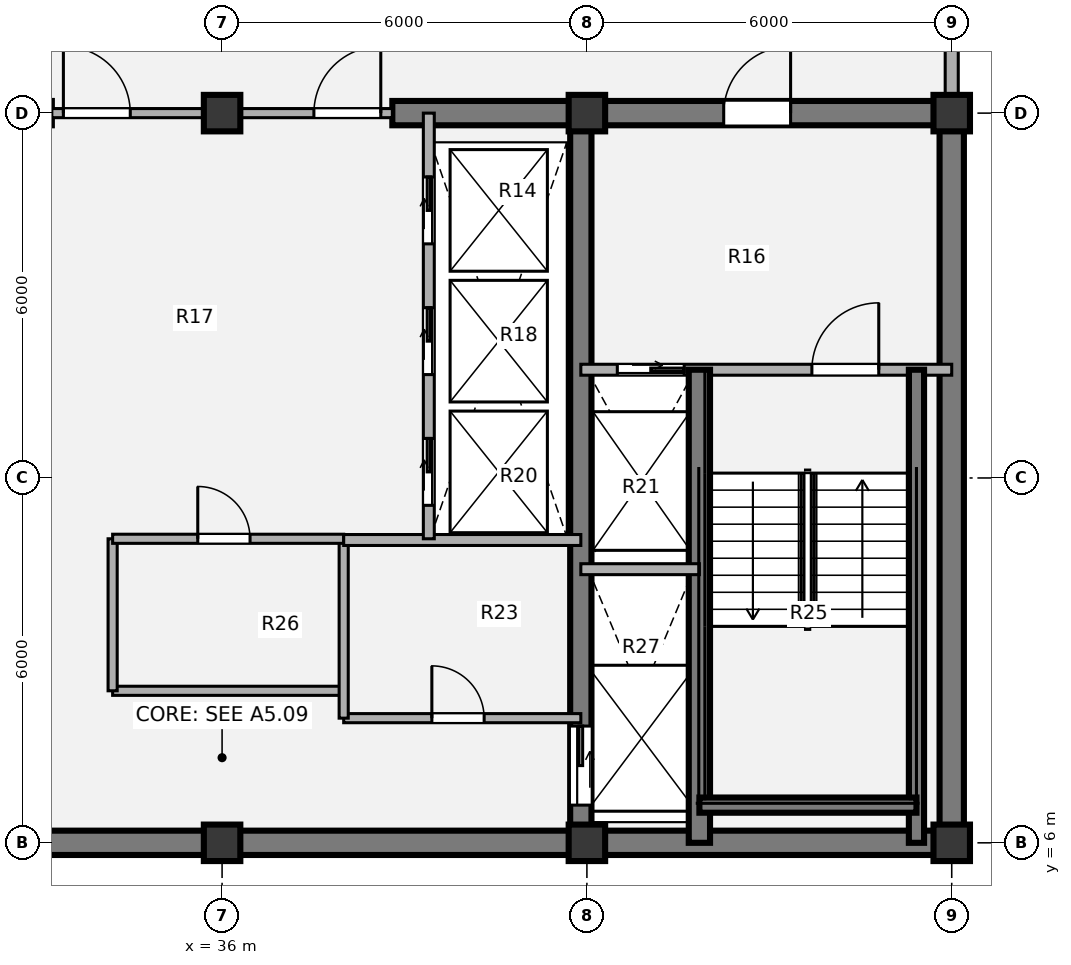
"""IFC4 building model, lengths in metres.
Left out: names, types, materials, properties, quantities, classifications, styles, units other than length and angle.
Written with IfcOpenShell. Run it as: python <this file> out.ifc"""

import sys

from ifc_helpers import new_model, si_unit, direction, frame, frame_2d, origin, origin_2d, place, context, subcontext, project, spatial, rectangle, extrude, source, transform, mapped, element, fill, save


model = new_model("IFC4")
c1 = context("Model", 3, precision=1e-05, world=origin(), true_north=direction((0.0, 1.0)))
c2 = subcontext(c1, "Body", "Model", "MODEL_VIEW")
j1 = project(units=[si_unit("LENGTHUNIT", "METRE"), si_unit("PLANEANGLEUNIT", "RADIAN")], contexts=[c1])
p1 = place(None, origin())
s1 = spatial("IfcSite", under=j1, at=p1, CompositionType="ELEMENT")
p2 = place(p1, origin())
s2 = spatial("IfcBuilding", under=s1, at=p2, CompositionType="ELEMENT")
p3 = place(p2, frame((0.0, 0.0, 283.5)))
s3 = spatial("IfcBuildingStorey", under=s2, at=p3, CompositionType="ELEMENT", Elevation=283.5)
m1 = source(origin(), c2, "Body", "SweptSolid", [
    extrude(rectangle(XDim=0.6, YDim=0.6, at=origin_2d()), origin(), (0.0, 0.0, 1.0), 3.78),
])
for number, where, z_axis, x_axis in (
    (1, (36.0, 6.0, 0.0), (0.0, 0.0, 1.0), (1.0, 0.0, 0.0)),
    (2, (42.0, 6.0, 0.0), (0.0, 0.0, 1.0), (1.0, 0.0, 0.0)),
    (3, (48.0, 6.0, 0.0), (0.0, 0.0, 1.0), (1.0, 0.0, 0.0)),
    (4, (36.0, 18.0, 0.0), (0.0, 0.0, 1.0), (1.0, 0.0, 0.0)),
    (5, (42.0, 18.0, 0.0), (0.0, 0.0, 1.0), (1.0, 0.0, 0.0)),
    (6, (48.0, 18.0, 0.0), (0.0, 0.0, 1.0), (1.0, 0.0, 0.0)),
):
    element("IfcColumn", number, at=place(p3, frame(where, z_axis=z_axis, x_axis=x_axis)), inside=s3, PredefinedType="COLUMN", context=c2, shape_type="MappedRepresentation", body=[
        mapped(m1, transform((0.0, 0.0, 0.0), x_axis=(1.0, 0.0, 0.0), y_axis=(0.0, 1.0, 0.0), z_axis=(0.0, 0.0, 1.0), scale=1.0)),
    ])
p4 = place(p3, frame((48.2, 6.0, 0.0), z_axis=(0.0, 0.0, 1.0), x_axis=(-1.0, 0.0, 0.0)))
e7 = element("IfcWall", 7, at=p4, inside=s3, PredefinedType="SHEAR", context=c2, shape_type="SweptSolid", body=[
    extrude(rectangle(XDim=24.4, YDim=0.4, at=frame_2d((12.2, 0.0))), origin(), (0.0, 0.0, 1.0), 3.78),
])
p5 = place(p3, frame((48.0, 18.0, 0.0), z_axis=(0.0, 0.0, 1.0), x_axis=(0.0, -1.0, 0.0)))
e8 = element("IfcWall", 8, at=p5, inside=s3, PredefinedType="SHEAR", context=c2, shape_type="SweptSolid", body=[
    extrude(rectangle(XDim=12.0, YDim=0.4, at=frame_2d((6.0, 0.0))), origin(), (0.0, 0.0, 1.0), 3.78),
])
p6 = place(p3, frame((38.8, 18.0, 0.0), z_axis=(0.0, 0.0, 1.0), x_axis=(1.0, 0.0, 0.0)))
e9 = element("IfcWall", 9, at=p6, inside=s3, PredefinedType="SHEAR", context=c2, shape_type="SweptSolid", body=[
    extrude(rectangle(XDim=9.4, YDim=0.4, at=frame_2d((4.7, 0.0))), origin(), (0.0, 0.0, 1.0), 3.78),
])
p7 = place(p6, frame((5.45, 0.0, 0.0)))
e10 = element("IfcOpeningElement", 10, at=p7, cuts=e9, PredefinedType="OPENING", context=c2, shape_type="SweptSolid", body=[
    extrude(rectangle(XDim=1.1, YDim=2.1, at=origin_2d()), frame((0.55, 0.21, 1.05), z_axis=(0.0, -1.0, 0.0), x_axis=(1.0, 0.0, 0.0)), (0.0, 0.0, 1.0), 0.42),
])
p8 = place(p3, frame((41.9, 18.0, 0.0), z_axis=(0.0, 0.0, 1.0), x_axis=(0.0, -1.0, 0.0)))
e11 = element("IfcWall", 11, at=p8, inside=s3, PredefinedType="SHEAR", context=c2, shape_type="SweptSolid", body=[
    extrude(rectangle(XDim=12.0, YDim=0.35, at=frame_2d((6.0, 0.0))), origin(), (0.0, 0.0, 1.0), 3.78),
])
p9 = place(p8, frame((10.08, 0.0, 0.0)))
e12 = element("IfcOpeningElement", 12, at=p9, cuts=e11, PredefinedType="OPENING", context=c2, shape_type="SweptSolid", body=[
    extrude(rectangle(XDim=1.3, YDim=2.1, at=origin_2d()), frame((0.65, 0.185, 1.05), z_axis=(0.0, -1.0, 0.0), x_axis=(1.0, 0.0, 0.0)), (0.0, 0.0, 1.0), 0.37),
])
p10 = place(p3, frame((48.0, 21.05, 0.0), z_axis=(0.0, 0.0, 1.0), x_axis=(0.0, -1.0, 0.0)))
e13 = element("IfcWall", 13, at=p10, inside=s3, PredefinedType="SOLIDWALL", context=c2, shape_type="SweptSolid", body=[
    extrude(rectangle(XDim=2.77, YDim=0.215, at=frame_2d((1.385, 0.0))), origin(), (0.0, 0.0, 1.0), 2.718),
])
p11 = place(p3, frame((34.2, 8.5, 0.0), z_axis=(0.0, 0.0, 1.0), x_axis=(1.0, 0.0, 0.0)))
e14 = element("IfcWall", 14, at=p11, inside=s3, PredefinedType="PARTITIONING", context=c2, shape_type="SweptSolid", body=[
    extrude(rectangle(XDim=3.8, YDim=0.15, at=frame_2d((1.9, 0.0))), origin(), (0.0, 0.0, 1.0), 3.5),
])
p12 = place(p3, frame((38.0, 8.05, 0.0), z_axis=(0.0, 0.0, 1.0), x_axis=(1.0, 0.0, 0.0)))
e15 = element("IfcWall", 15, at=p12, inside=s3, PredefinedType="PARTITIONING", context=c2, shape_type="SweptSolid", body=[
    extrude(rectangle(XDim=3.9, YDim=0.15, at=frame_2d((1.95, 0.0))), origin(), (0.0, 0.0, 1.0), 3.5),
])
p13 = place(p12, frame((1.45, 0.0, 0.0)))
e16 = element("IfcOpeningElement", 16, at=p13, cuts=e15, PredefinedType="OPENING", context=c2, shape_type="SweptSolid", body=[
    extrude(rectangle(XDim=0.86, YDim=2.1, at=origin_2d()), frame((0.43, 0.085, 1.05), z_axis=(0.0, -1.0, 0.0), x_axis=(1.0, 0.0, 0.0)), (0.0, 0.0, 1.0), 0.17),
])
p14 = place(p3, frame((34.2, 8.5, 0.0), z_axis=(0.0, 0.0, 1.0), x_axis=(0.0, 1.0, 0.0)))
e17 = element("IfcWall", 17, at=p14, inside=s3, PredefinedType="PARTITIONING", context=c2, shape_type="SweptSolid", body=[
    extrude(rectangle(XDim=2.5, YDim=0.15, at=frame_2d((1.25, 0.0))), origin(), (0.0, 0.0, 1.0), 3.5),
])
p15 = place(p3, frame((38.0, 8.05, 0.0), z_axis=(0.0, 0.0, 1.0), x_axis=(0.0, 1.0, 0.0)))
e18 = element("IfcWall", 18, at=p15, inside=s3, PredefinedType="PARTITIONING", context=c2, shape_type="SweptSolid", body=[
    extrude(rectangle(XDim=2.95, YDim=0.15, at=frame_2d((1.475, 0.0))), origin(), (0.0, 0.0, 1.0), 3.5),
])
p16 = place(p3, frame((34.2, 11.0, 0.0), z_axis=(0.0, 0.0, 1.0), x_axis=(1.0, 0.0, 0.0)))
e19 = element("IfcWall", 19, at=p16, inside=s3, PredefinedType="PARTITIONING", context=c2, shape_type="SweptSolid", body=[
    extrude(rectangle(XDim=3.8, YDim=0.15, at=frame_2d((1.9, 0.0))), origin(), (0.0, 0.0, 1.0), 3.5),
])
p17 = place(p16, frame((1.4, 0.0, 0.0)))
e20 = element("IfcOpeningElement", 20, at=p17, cuts=e19, PredefinedType="OPENING", context=c2, shape_type="SweptSolid", body=[
    extrude(rectangle(XDim=0.86, YDim=2.1, at=origin_2d()), frame((0.43, 0.085, 1.05), z_axis=(0.0, -1.0, 0.0), x_axis=(1.0, 0.0, 0.0)), (0.0, 0.0, 1.0), 0.17),
])
p18 = place(p3, frame((38.0, 10.98, 0.0), z_axis=(0.0, 0.0, 1.0), x_axis=(1.0, 0.0, 0.0)))
e21 = element("IfcWall", 21, at=p18, inside=s3, PredefinedType="PARTITIONING", context=c2, shape_type="SweptSolid", body=[
    extrude(rectangle(XDim=3.9, YDim=0.18, at=frame_2d((1.95, 0.0))), origin(), (0.0, 0.0, 1.0), 3.5),
])
p19 = place(p3, frame((33.2, 18.0, 0.0), z_axis=(0.0, 0.0, 1.0), x_axis=(1.0, 0.0, 0.0)))
e22 = element("IfcWall", 22, at=p19, inside=s3, PredefinedType="PARTITIONING", context=c2, shape_type="SweptSolid", body=[
    extrude(rectangle(XDim=5.6, YDim=0.15, at=frame_2d((2.8, 0.0))), origin(), (0.0, 0.0, 1.0), 2.515),
])
p20 = place(p19, frame((0.19, 0.0, 0.0)))
e23 = element("IfcOpeningElement", 23, at=p20, cuts=e22, PredefinedType="OPENING", context=c2, shape_type="SweptSolid", body=[
    extrude(rectangle(XDim=1.1, YDim=2.1, at=origin_2d()), frame((0.55, 0.085, 1.05), z_axis=(0.0, -1.0, 0.0), x_axis=(1.0, 0.0, 0.0)), (0.0, 0.0, 1.0), 0.17),
])
p21 = place(p19, frame((4.31, 0.0, 0.0)))
e24 = element("IfcOpeningElement", 24, at=p21, cuts=e22, PredefinedType="OPENING", context=c2, shape_type="SweptSolid", body=[
    extrude(rectangle(XDim=1.1, YDim=2.1, at=origin_2d()), frame((0.55, 0.085, 1.05), z_axis=(0.0, -1.0, 0.0), x_axis=(1.0, 0.0, 0.0)), (0.0, 0.0, 1.0), 0.17),
])
p22 = place(p3, frame((41.9, 13.78, 0.0), z_axis=(0.0, 0.0, 1.0), x_axis=(1.0, 0.0, 0.0)))
e25 = element("IfcWall", 25, at=p22, inside=s3, PredefinedType="PARTITIONING", context=c2, shape_type="SweptSolid", body=[
    extrude(rectangle(XDim=6.1, YDim=0.18, at=frame_2d((3.05, 0.0))), origin(), (0.0, 0.0, 1.0), 3.5),
])
p23 = place(p22, frame((0.6, 0.0, 0.0)))
e26 = element("IfcOpeningElement", 26, at=p23, cuts=e25, PredefinedType="OPENING", context=c2, shape_type="SweptSolid", body=[
    extrude(rectangle(XDim=1.1, YDim=2.1, at=origin_2d()), frame((0.55, 0.1, 1.05), z_axis=(0.0, -1.0, 0.0), x_axis=(1.0, 0.0, 0.0)), (0.0, 0.0, 1.0), 0.2),
])
p24 = place(p22, frame((3.8, 0.0, 0.0)))
e27 = element("IfcOpeningElement", 27, at=p24, cuts=e25, PredefinedType="OPENING", context=c2, shape_type="SweptSolid", body=[
    extrude(rectangle(XDim=1.1, YDim=2.1, at=origin_2d()), frame((0.55, 0.1, 1.05), z_axis=(0.0, -1.0, 0.0), x_axis=(1.0, 0.0, 0.0)), (0.0, 0.0, 1.0), 0.2),
])
p25 = place(p3, frame((43.85, 6.0, 0.0), z_axis=(0.0, 0.0, 1.0), x_axis=(0.0, 1.0, 0.0)))
e28 = element("IfcWall", 28, at=p25, inside=s3, PredefinedType="SHEAR", context=c2, shape_type="SweptSolid", body=[
    extrude(rectangle(XDim=7.78, YDim=0.35, at=frame_2d((3.89, 0.0))), origin(), (0.0, 0.0, 1.0), 3.85),
])
p26 = place(p3, frame((47.42, 6.0, 0.0), z_axis=(0.0, 0.0, 1.0), x_axis=(0.0, 1.0, 0.0)))
e29 = element("IfcWall", 29, at=p26, inside=s3, PredefinedType="SHEAR", context=c2, shape_type="SweptSolid", body=[
    extrude(rectangle(XDim=7.78, YDim=0.25, at=frame_2d((3.89, 0.0))), origin(), (0.0, 0.0, 1.0), 3.85),
])
p27 = place(p3, frame((43.85, 6.62, 0.0), z_axis=(0.0, 0.0, 1.0), x_axis=(1.0, 0.0, 0.0)))
e30 = element("IfcWall", 30, at=p27, inside=s3, PredefinedType="SHEAR", context=c2, shape_type="SweptSolid", body=[
    extrude(rectangle(XDim=3.57, YDim=0.25, at=frame_2d((1.785, 0.0))), origin(), (0.0, 0.0, 1.0), 3.85),
])
p28 = place(p3, frame((41.9, 10.5, 0.0), z_axis=(0.0, 0.0, 1.0), x_axis=(1.0, 0.0, 0.0)))
e31 = element("IfcWall", 31, at=p28, inside=s3, PredefinedType="PARTITIONING", context=c2, shape_type="SweptSolid", body=[
    extrude(rectangle(XDim=1.95, YDim=0.18, at=frame_2d((0.975, 0.0))), origin(), (0.0, 0.0, 1.0), 3.5),
])
p29 = place(p3, frame((39.4, 11.0, 0.0), z_axis=(0.0, 0.0, 1.0), x_axis=(0.0, 1.0, 0.0)))
e32 = element("IfcWall", 32, at=p29, inside=s3, PredefinedType="PARTITIONING", context=c2, shape_type="SweptSolid", body=[
    extrude(rectangle(XDim=7.0, YDim=0.18, at=frame_2d((3.5, 0.0))), origin(), (0.0, 0.0, 1.0), 3.5),
])
p30 = place(p29, frame((0.55, 0.0, 0.0)))
e33 = element("IfcOpeningElement", 33, at=p30, cuts=e32, PredefinedType="OPENING", context=c2, shape_type="SweptSolid", body=[
    extrude(rectangle(XDim=1.1, YDim=2.1, at=origin_2d()), frame((0.55, 0.1, 1.05), z_axis=(0.0, -1.0, 0.0), x_axis=(1.0, 0.0, 0.0)), (0.0, 0.0, 1.0), 0.2),
])
p31 = place(p29, frame((2.7, 0.0, 0.0)))
e34 = element("IfcOpeningElement", 34, at=p31, cuts=e32, PredefinedType="OPENING", context=c2, shape_type="SweptSolid", body=[
    extrude(rectangle(XDim=1.1, YDim=2.1, at=origin_2d()), frame((0.55, 0.1, 1.05), z_axis=(0.0, -1.0, 0.0), x_axis=(1.0, 0.0, 0.0)), (0.0, 0.0, 1.0), 0.2),
])
p32 = place(p29, frame((4.85, 0.0, 0.0)))
e35 = element("IfcOpeningElement", 35, at=p32, cuts=e32, PredefinedType="OPENING", context=c2, shape_type="SweptSolid", body=[
    extrude(rectangle(XDim=1.1, YDim=2.1, at=origin_2d()), frame((0.55, 0.1, 1.05), z_axis=(0.0, -1.0, 0.0), x_axis=(1.0, 0.0, 0.0)), (0.0, 0.0, 1.0), 0.2),
])
m2 = source(origin(), c2, "Body", "SweptSolid", [
    extrude(rectangle(XDim=0.86, YDim=2.1, at=origin_2d()), frame((0.43, 0.025, 1.05), z_axis=(0.0, -1.0, 0.0), x_axis=(1.0, 0.0, 0.0)), (0.0, 0.0, 1.0), 0.05),
])
p33 = place(p13, origin())
e36 = element("IfcDoor", 36, at=p33, inside=s3, OperationType="SINGLE_SWING_LEFT", PredefinedType="DOOR", context=c2, shape_type="MappedRepresentation", body=[
    mapped(m2, transform((0.0, 0.0, 0.0), x_axis=(1.0, 0.0, 0.0), y_axis=(0.0, 1.0, 0.0), z_axis=(0.0, 0.0, 1.0), scale=1.0)),
])
fill(e16, e36)
p34 = place(p17, origin())
e37 = element("IfcDoor", 37, at=p34, inside=s3, OperationType="SINGLE_SWING_LEFT", PredefinedType="DOOR", context=c2, shape_type="MappedRepresentation", body=[
    mapped(m2, transform((0.0, 0.0, 0.0), x_axis=(1.0, 0.0, 0.0), y_axis=(0.0, 1.0, 0.0), z_axis=(0.0, 0.0, 1.0), scale=1.0)),
])
fill(e20, e37)
m3 = source(origin(), c2, "Body", "SweptSolid", [
    extrude(rectangle(XDim=1.1, YDim=2.1, at=origin_2d()), frame((0.55, 0.025, 1.05), z_axis=(0.0, -1.0, 0.0), x_axis=(1.0, 0.0, 0.0)), (0.0, 0.0, 1.0), 0.05),
])
p35 = place(p20, origin())
e38 = element("IfcDoor", 38, at=p35, inside=s3, OperationType="SINGLE_SWING_LEFT", PredefinedType="DOOR", context=c2, shape_type="MappedRepresentation", body=[
    mapped(m3, transform((0.0, 0.0, 0.0), x_axis=(1.0, 0.0, 0.0), y_axis=(0.0, 1.0, 0.0), z_axis=(0.0, 0.0, 1.0), scale=1.0)),
])
fill(e23, e38)
p36 = place(p21, origin())
e39 = element("IfcDoor", 39, at=p36, inside=s3, OperationType="SINGLE_SWING_RIGHT", PredefinedType="DOOR", context=c2, shape_type="MappedRepresentation", body=[
    mapped(m3, transform((0.0, 0.0, 0.0), x_axis=(1.0, 0.0, 0.0), y_axis=(0.0, 1.0, 0.0), z_axis=(0.0, 0.0, 1.0), scale=1.0)),
])
fill(e24, e39)
m4 = source(origin(), c2, "Body", "SweptSolid", [
    extrude(rectangle(XDim=1.1, YDim=2.1, at=origin_2d()), frame((0.55, 0.025, 1.05), z_axis=(0.0, -1.0, 0.0), x_axis=(1.0, 0.0, 0.0)), (0.0, 0.0, 1.0), 0.05),
])
p37 = place(p23, origin())
e40 = element("IfcDoor", 40, at=p37, inside=s3, OperationType="SLIDING_TO_RIGHT", PredefinedType="DOOR", context=c2, shape_type="MappedRepresentation", body=[
    mapped(m4, transform((0.0, 0.0, 0.0), x_axis=(1.0, 0.0, 0.0), y_axis=(0.0, 1.0, 0.0), z_axis=(0.0, 0.0, 1.0), scale=1.0)),
])
fill(e26, e40)
m5 = source(origin(), c2, "Body", "SweptSolid", [
    extrude(rectangle(XDim=1.1, YDim=2.1, at=origin_2d()), frame((0.55, 0.025, 1.05), z_axis=(0.0, -1.0, 0.0), x_axis=(1.0, 0.0, 0.0)), (0.0, 0.0, 1.0), 0.05),
])
p38 = place(p24, origin())
e41 = element("IfcDoor", 41, at=p38, inside=s3, OperationType="SINGLE_SWING_RIGHT", PredefinedType="DOOR", context=c2, shape_type="MappedRepresentation", body=[
    mapped(m5, transform((0.0, 0.0, 0.0), x_axis=(1.0, 0.0, 0.0), y_axis=(0.0, 1.0, 0.0), z_axis=(0.0, 0.0, 1.0), scale=1.0)),
])
fill(e27, e41)
m6 = source(origin(), c2, "Body", "SweptSolid", [
    extrude(rectangle(XDim=1.3, YDim=2.1, at=origin_2d()), frame((0.65, 0.025, 1.05), z_axis=(0.0, -1.0, 0.0), x_axis=(1.0, 0.0, 0.0)), (0.0, 0.0, 1.0), 0.05),
])
p39 = place(p9, origin())
e42 = element("IfcDoor", 42, at=p39, inside=s3, OperationType="SLIDING_TO_LEFT", PredefinedType="DOOR", context=c2, shape_type="MappedRepresentation", body=[
    mapped(m6, transform((0.0, 0.0, 0.0), x_axis=(1.0, 0.0, 0.0), y_axis=(0.0, 1.0, 0.0), z_axis=(0.0, 0.0, 1.0), scale=1.0)),
])
fill(e12, e42)
p40 = place(p7, origin())
e43 = element("IfcDoor", 43, at=p40, inside=s3, OperationType="SINGLE_SWING_RIGHT", PredefinedType="DOOR", context=c2, shape_type="MappedRepresentation", body=[
    mapped(m3, transform((0.0, 0.0, 0.0), x_axis=(1.0, 0.0, 0.0), y_axis=(0.0, 1.0, 0.0), z_axis=(0.0, 0.0, 1.0), scale=1.0)),
])
fill(e10, e43)
p41 = place(p30, origin())
e44 = element("IfcDoor", 44, at=p41, inside=s3, OperationType="SLIDING_TO_RIGHT", PredefinedType="DOOR", context=c2, shape_type="MappedRepresentation", body=[
    mapped(m4, transform((0.0, 0.0, 0.0), x_axis=(1.0, 0.0, 0.0), y_axis=(0.0, 1.0, 0.0), z_axis=(0.0, 0.0, 1.0), scale=1.0)),
])
fill(e33, e44)
p42 = place(p31, origin())
e45 = element("IfcDoor", 45, at=p42, inside=s3, OperationType="SLIDING_TO_RIGHT", PredefinedType="DOOR", context=c2, shape_type="MappedRepresentation", body=[
    mapped(m4, transform((0.0, 0.0, 0.0), x_axis=(1.0, 0.0, 0.0), y_axis=(0.0, 1.0, 0.0), z_axis=(0.0, 0.0, 1.0), scale=1.0)),
])
fill(e34, e45)
p43 = place(p32, origin())
e46 = element("IfcDoor", 46, at=p43, inside=s3, OperationType="SLIDING_TO_RIGHT", PredefinedType="DOOR", context=c2, shape_type="MappedRepresentation", body=[
    mapped(m4, transform((0.0, 0.0, 0.0), x_axis=(1.0, 0.0, 0.0), y_axis=(0.0, 1.0, 0.0), z_axis=(0.0, 0.0, 1.0), scale=1.0)),
])
fill(e35, e46)
save(model, sys.argv[1])
